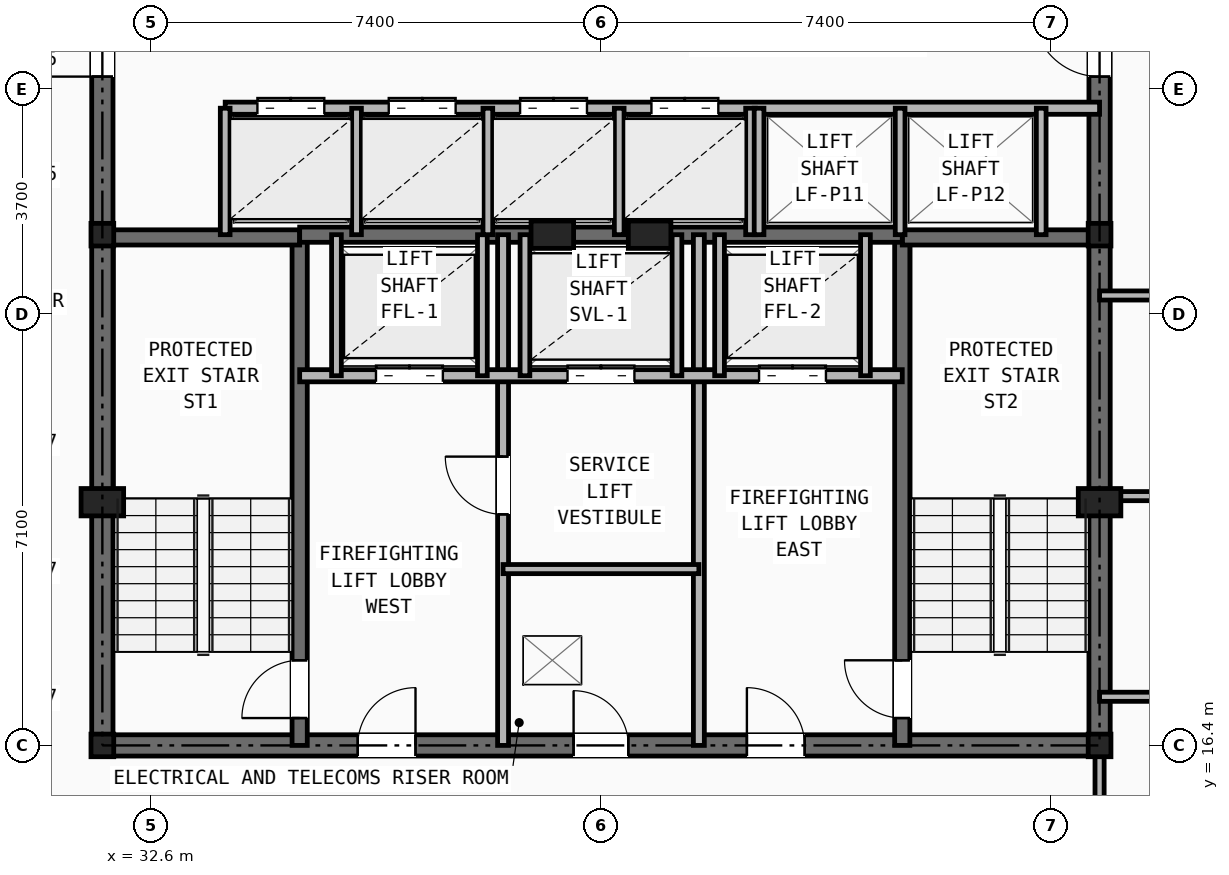
"""IFC4 building model, lengths in metres.
Left out: names, types, materials, properties, quantities, classifications, styles, units other than length and angle.
Written with IfcOpenShell. Run it as: python <this file> out.ifc"""

import sys

from ifc_helpers import new_model, si_unit, direction, frame, frame_2d, origin, origin_2d, place, context, subcontext, project, spatial, rectangle, i_section, extrude, element, fill, save


model = new_model("IFC4")
c1 = context("Model", 3, precision=1e-05, world=origin(), true_north=direction((0.0, 1.0)))
c2 = subcontext(c1, "Body", "Model", "MODEL_VIEW")
j1 = project(units=[si_unit("LENGTHUNIT", "METRE"), si_unit("PLANEANGLEUNIT", "RADIAN")], contexts=[c1])
p1 = place(None, origin())
s1 = spatial("IfcSite", under=j1, at=p1, CompositionType="ELEMENT")
p2 = place(p1, origin())
s2 = spatial("IfcBuilding", under=s1, at=p2, CompositionType="ELEMENT")
p3 = place(p2, frame((0.0, 0.0, 175.8)))
s3 = spatial("IfcBuildingStorey", under=s2, at=p3, CompositionType="ELEMENT", Elevation=175.8)
for number, where, z_axis, x_axis in (
    (1, (31.8, 16.4, 0.0), (0.0, 0.0, 1.0), (1.0, 0.0, 0.0)),
    (2, (48.2, 16.4, 0.0), (0.0, 0.0, 1.0), (1.0, 0.0, 0.0)),
    (3, (31.8, 24.8, 0.0), (0.0, 0.0, 1.0), (1.0, 0.0, 0.0)),
    (4, (48.2, 24.8, 0.0), (0.0, 0.0, 1.0), (1.0, 0.0, 0.0)),
):
    element("IfcColumn", number, at=place(p3, frame(where, z_axis=z_axis, x_axis=x_axis)), inside=s3, PredefinedType="COLUMN", context=c2, shape_type="SweptSolid", body=[
        extrude(i_section(OverallWidth=0.374, OverallDepth=0.372, WebThickness=0.016, FlangeThickness=0.026, at=origin_2d()), origin(), (0.0, 0.0, 1.0), 3.45),
    ])
for number, where, z_axis, x_axis in (
    (5, (31.8, 20.4, 0.0), (0.0, 0.0, 1.0), (1.0, 0.0, 0.0)),
    (6, (48.2, 20.4, 0.0), (0.0, 0.0, 1.0), (1.0, 0.0, 0.0)),
    (7, (39.2, 24.8, 0.0), (0.0, 0.0, 1.0), (1.0, 0.0, 0.0)),
    (8, (40.8, 24.8, 0.0), (0.0, 0.0, 1.0), (1.0, 0.0, 0.0)),
):
    element("IfcColumn", number, at=place(p3, frame(where, z_axis=z_axis, x_axis=x_axis)), inside=s3, PredefinedType="PILASTER", context=c2, shape_type="SweptSolid", body=[
        extrude(rectangle(XDim=0.7, YDim=0.45, at=origin_2d()), origin(), (0.0, 0.0, 1.0), 3.45),
    ])
p4 = place(p3, frame((31.8, 16.4, 0.0), z_axis=(0.0, 0.0, 1.0), x_axis=(1.0, 0.0, 0.0)))
e9 = element("IfcWall", 9, at=p4, inside=s3, PredefinedType="SHEAR", context=c2, shape_type="SweptSolid", body=[
    extrude(rectangle(XDim=16.4, YDim=0.35, at=frame_2d((8.2, 0.0))), origin(), (0.0, 0.0, 1.0), 3.21),
])
p5 = place(p4, frame((7.75, 0.0, 0.0)))
e10 = element("IfcOpeningElement", 10, at=p5, cuts=e9, PredefinedType="OPENING", context=c2, shape_type="SweptSolid", body=[
    extrude(rectangle(XDim=0.9, YDim=2.1, at=frame_2d((0.45, 1.05))), frame((0.0, 0.185, 0.0), z_axis=(0.0, -1.0, 0.0), x_axis=(1.0, 0.0, 0.0)), (0.0, 0.0, 1.0), 0.37),
])
p6 = place(p4, frame((4.2, 0.0, 0.0)))
e11 = element("IfcOpeningElement", 11, at=p6, cuts=e9, PredefinedType="OPENING", context=c2, shape_type="SweptSolid", body=[
    extrude(rectangle(XDim=0.95, YDim=2.1, at=frame_2d((0.475, 1.05))), frame((0.0, 0.185, 0.0), z_axis=(0.0, -1.0, 0.0), x_axis=(1.0, 0.0, 0.0)), (0.0, 0.0, 1.0), 0.37),
])
p7 = place(p4, frame((10.6, 0.0, 0.0)))
e12 = element("IfcOpeningElement", 12, at=p7, cuts=e9, PredefinedType="OPENING", context=c2, shape_type="SweptSolid", body=[
    extrude(rectangle(XDim=0.95, YDim=2.1, at=frame_2d((0.475, 1.05))), frame((0.0, 0.185, 0.0), z_axis=(0.0, -1.0, 0.0), x_axis=(1.0, 0.0, 0.0)), (0.0, 0.0, 1.0), 0.37),
])
p8 = place(p3, frame((31.8, 16.4, 0.0), z_axis=(0.0, 0.0, 1.0), x_axis=(0.0, 1.0, 0.0)))
e13 = element("IfcWall", 13, at=p8, inside=s3, PredefinedType="SHEAR", context=c2, shape_type="SweptSolid", body=[
    extrude(rectangle(XDim=14.8, YDim=0.35, at=frame_2d((7.4, 0.0))), origin(), (0.0, 0.0, 1.0), 3.21),
])
p9 = place(p8, frame((11.0, 0.0, 0.0)))
e14 = element("IfcOpeningElement", 14, at=p9, cuts=e13, PredefinedType="OPENING", context=c2, shape_type="SweptSolid", body=[
    extrude(rectangle(XDim=1.1, YDim=2.15, at=frame_2d((0.55, 1.075))), frame((0.0, 0.185, 0.0), z_axis=(0.0, -1.0, 0.0), x_axis=(1.0, 0.0, 0.0)), (0.0, 0.0, 1.0), 0.37),
])
p10 = place(p3, frame((48.2, 16.4, 0.0), z_axis=(0.0, 0.0, 1.0), x_axis=(0.0, 1.0, 0.0)))
e15 = element("IfcWall", 15, at=p10, inside=s3, PredefinedType="SHEAR", context=c2, shape_type="SweptSolid", body=[
    extrude(rectangle(XDim=14.8, YDim=0.35, at=frame_2d((7.4, 0.0))), origin(), (0.0, 0.0, 1.0), 3.21),
])
p11 = place(p10, frame((11.0, 0.0, 0.0)))
e16 = element("IfcOpeningElement", 16, at=p11, cuts=e15, PredefinedType="OPENING", context=c2, shape_type="SweptSolid", body=[
    extrude(rectangle(XDim=1.1, YDim=2.15, at=frame_2d((0.55, 1.075))), frame((0.0, 0.185, 0.0), z_axis=(0.0, -1.0, 0.0), x_axis=(1.0, 0.0, 0.0)), (0.0, 0.0, 1.0), 0.37),
])
p12 = place(p3, frame((35.045, 16.4, 0.0), z_axis=(0.0, 0.0, 1.0), x_axis=(0.0, 1.0, 0.0)))
e17 = element("IfcWall", 17, at=p12, inside=s3, PredefinedType="SHEAR", context=c2, shape_type="SweptSolid", body=[
    extrude(rectangle(XDim=8.4, YDim=0.25, at=frame_2d((4.2, 0.0))), origin(), (0.0, 0.0, 1.0), 3.21),
])
p13 = place(p12, frame((0.45, 0.0, 0.0)))
e18 = element("IfcOpeningElement", 18, at=p13, cuts=e17, PredefinedType="OPENING", context=c2, shape_type="SweptSolid", body=[
    extrude(rectangle(XDim=0.95, YDim=2.1, at=frame_2d((0.475, 1.05))), frame((0.0, 0.135, 0.0), z_axis=(0.0, -1.0, 0.0), x_axis=(1.0, 0.0, 0.0)), (0.0, 0.0, 1.0), 0.27),
])
p14 = place(p3, frame((31.8, 24.755, 0.0), z_axis=(0.0, 0.0, 1.0), x_axis=(1.0, 0.0, 0.0)))
e19 = element("IfcWall", 19, at=p14, inside=s3, PredefinedType="SHEAR", context=c2, shape_type="SweptSolid", body=[
    extrude(rectangle(XDim=3.245, YDim=0.25, at=frame_2d((1.623, 0.0))), origin(), (0.0, 0.0, 1.0), 3.21),
])
p15 = place(p3, frame((44.955, 16.4, 0.0), z_axis=(0.0, 0.0, 1.0), x_axis=(0.0, 1.0, 0.0)))
e20 = element("IfcWall", 20, at=p15, inside=s3, PredefinedType="SHEAR", context=c2, shape_type="SweptSolid", body=[
    extrude(rectangle(XDim=8.4, YDim=0.25, at=frame_2d((4.2, 0.0))), origin(), (0.0, 0.0, 1.0), 3.21),
])
p16 = place(p15, frame((0.45, 0.0, 0.0)))
e21 = element("IfcOpeningElement", 21, at=p16, cuts=e20, PredefinedType="OPENING", context=c2, shape_type="SweptSolid", body=[
    extrude(rectangle(XDim=0.95, YDim=2.1, at=frame_2d((0.475, 1.05))), frame((0.0, 0.135, 0.0), z_axis=(0.0, -1.0, 0.0), x_axis=(1.0, 0.0, 0.0)), (0.0, 0.0, 1.0), 0.27),
])
p17 = place(p3, frame((44.955, 24.755, 0.0), z_axis=(0.0, 0.0, 1.0), x_axis=(1.0, 0.0, 0.0)))
e22 = element("IfcWall", 22, at=p17, inside=s3, PredefinedType="SHEAR", context=c2, shape_type="SweptSolid", body=[
    extrude(rectangle(XDim=3.245, YDim=0.25, at=frame_2d((1.623, 0.0))), origin(), (0.0, 0.0, 1.0), 3.21),
])
p18 = place(p3, frame((35.045, 24.8, 0.0), z_axis=(0.0, 0.0, 1.0), x_axis=(1.0, 0.0, 0.0)))
e23 = element("IfcWall", 23, at=p18, inside=s3, PredefinedType="SHEAR", context=c2, shape_type="SweptSolid", body=[
    extrude(rectangle(XDim=9.91, YDim=0.25, at=frame_2d((4.955, 0.0))), origin(), (0.0, 0.0, 1.0), 3.21),
])
p19 = place(p3, frame((38.39, 16.4, 0.0), z_axis=(0.0, 0.0, 1.0), x_axis=(0.0, 1.0, 0.0)))
e24 = element("IfcWall", 24, at=p19, inside=s3, PredefinedType="PARTITIONING", context=c2, shape_type="SweptSolid", body=[
    extrude(rectangle(XDim=8.4, YDim=0.18, at=frame_2d((4.2, 0.0))), origin(), (0.0, 0.0, 1.0), 2.938),
])
p20 = place(p19, frame((3.8, 0.0, 0.0)))
e25 = element("IfcOpeningElement", 25, at=p20, cuts=e24, PredefinedType="OPENING", context=c2, shape_type="SweptSolid", body=[
    extrude(rectangle(XDim=0.95, YDim=2.1, at=frame_2d((0.475, 1.05))), frame((0.0, 0.1, 0.0), z_axis=(0.0, -1.0, 0.0), x_axis=(1.0, 0.0, 0.0)), (0.0, 0.0, 1.0), 0.2),
])
p21 = place(p3, frame((41.61, 16.4, 0.0), z_axis=(0.0, 0.0, 1.0), x_axis=(0.0, 1.0, 0.0)))
e26 = element("IfcWall", 26, at=p21, inside=s3, PredefinedType="PARTITIONING", context=c2, shape_type="SweptSolid", body=[
    extrude(rectangle(XDim=8.4, YDim=0.18, at=frame_2d((4.2, 0.0))), origin(), (0.0, 0.0, 1.0), 2.938),
])
p22 = place(p3, frame((35.045, 22.48, 0.0), z_axis=(0.0, 0.0, 1.0), x_axis=(1.0, 0.0, 0.0)))
e27 = element("IfcWall", 27, at=p22, inside=s3, PredefinedType="SOLIDWALL", context=c2, shape_type="SweptSolid", body=[
    extrude(rectangle(XDim=9.91, YDim=0.2, at=frame_2d((4.955, 0.0))), origin(), (0.0, 0.0, 1.0), 3.21),
])
p23 = place(p22, frame((1.255, 0.0, 0.0)))
e28 = element("IfcOpeningElement", 28, at=p23, cuts=e27, PredefinedType="OPENING", context=c2, shape_type="SweptSolid", body=[
    extrude(rectangle(XDim=1.1, YDim=2.15, at=frame_2d((0.55, 1.075))), frame((0.0, 0.11, 0.0), z_axis=(0.0, -1.0, 0.0), x_axis=(1.0, 0.0, 0.0)), (0.0, 0.0, 1.0), 0.22),
])
p24 = place(p22, frame((7.555, 0.0, 0.0)))
e29 = element("IfcOpeningElement", 29, at=p24, cuts=e27, PredefinedType="OPENING", context=c2, shape_type="SweptSolid", body=[
    extrude(rectangle(XDim=1.1, YDim=2.15, at=frame_2d((0.55, 1.075))), frame((0.0, 0.11, 0.0), z_axis=(0.0, -1.0, 0.0), x_axis=(1.0, 0.0, 0.0)), (0.0, 0.0, 1.0), 0.22),
])
p25 = place(p22, frame((4.405, 0.0, 0.0)))
e30 = element("IfcOpeningElement", 30, at=p25, cuts=e27, PredefinedType="OPENING", context=c2, shape_type="SweptSolid", body=[
    extrude(rectangle(XDim=1.1, YDim=2.15, at=frame_2d((0.55, 1.075))), frame((0.0, 0.11, 0.0), z_axis=(0.0, -1.0, 0.0), x_axis=(1.0, 0.0, 0.0)), (0.0, 0.0, 1.0), 0.22),
])
p26 = place(p3, frame((38.39, 19.3, 0.0), z_axis=(0.0, 0.0, 1.0), x_axis=(1.0, 0.0, 0.0)))
e31 = element("IfcWall", 31, at=p26, inside=s3, PredefinedType="PARTITIONING", context=c2, shape_type="SweptSolid", body=[
    extrude(rectangle(XDim=3.22, YDim=0.15, at=frame_2d((1.61, 0.0))), origin(), (0.0, 0.0, 1.0), 3.21),
])
for number, where, z_axis, x_axis in (
    (32, (35.65, 22.48, 0.0), (0.0, 0.0, 1.0), (0.0, 1.0, 0.0)),
    (33, (38.05, 22.48, 0.0), (0.0, 0.0, 1.0), (0.0, 1.0, 0.0)),
    (34, (41.95, 22.48, 0.0), (0.0, 0.0, 1.0), (0.0, 1.0, 0.0)),
    (35, (44.35, 22.48, 0.0), (0.0, 0.0, 1.0), (0.0, 1.0, 0.0)),
    (36, (38.75, 22.48, 0.0), (0.0, 0.0, 1.0), (0.0, 1.0, 0.0)),
    (37, (41.25, 22.48, 0.0), (0.0, 0.0, 1.0), (0.0, 1.0, 0.0)),
):
    element("IfcWall", number, at=place(p3, frame(where, z_axis=z_axis, x_axis=x_axis)), inside=s3, PredefinedType="SOLIDWALL", context=c2, shape_type="SweptSolid", body=[
        extrude(rectangle(XDim=2.32, YDim=0.16, at=frame_2d((1.16, 0.0))), origin(), (0.0, 0.0, 1.0), 3.21),
    ])
p27 = place(p3, frame((33.82, 26.88, 0.0), z_axis=(0.0, 0.0, 1.0), x_axis=(1.0, 0.0, 0.0)))
e38 = element("IfcWall", 38, at=p27, inside=s3, PredefinedType="SOLIDWALL", context=c2, shape_type="SweptSolid", body=[
    extrude(rectangle(XDim=14.38, YDim=0.2, at=frame_2d((7.19, 0.0))), origin(), (0.0, 0.0, 1.0), 2.665),
])
p28 = place(p27, frame((0.53, 0.0, 0.0)))
e39 = element("IfcOpeningElement", 39, at=p28, cuts=e38, PredefinedType="OPENING", context=c2, shape_type="SweptSolid", body=[
    extrude(rectangle(XDim=1.1, YDim=2.15, at=frame_2d((0.55, 1.075))), frame((0.0, 0.11, 0.0), z_axis=(0.0, -1.0, 0.0), x_axis=(1.0, 0.0, 0.0)), (0.0, 0.0, 1.0), 0.22),
])
p29 = place(p27, frame((2.69, 0.0, 0.0)))
e40 = element("IfcOpeningElement", 40, at=p29, cuts=e38, PredefinedType="OPENING", context=c2, shape_type="SweptSolid", body=[
    extrude(rectangle(XDim=1.1, YDim=2.15, at=frame_2d((0.55, 1.075))), frame((0.0, 0.11, 0.0), z_axis=(0.0, -1.0, 0.0), x_axis=(1.0, 0.0, 0.0)), (0.0, 0.0, 1.0), 0.22),
])
p30 = place(p27, frame((4.85, 0.0, 0.0)))
e41 = element("IfcOpeningElement", 41, at=p30, cuts=e38, PredefinedType="OPENING", context=c2, shape_type="SweptSolid", body=[
    extrude(rectangle(XDim=1.1, YDim=2.15, at=frame_2d((0.55, 1.075))), frame((0.0, 0.11, 0.0), z_axis=(0.0, -1.0, 0.0), x_axis=(1.0, 0.0, 0.0)), (0.0, 0.0, 1.0), 0.22),
])
p31 = place(p27, frame((7.01, 0.0, 0.0)))
e42 = element("IfcOpeningElement", 42, at=p31, cuts=e38, PredefinedType="OPENING", context=c2, shape_type="SweptSolid", body=[
    extrude(rectangle(XDim=1.1, YDim=2.15, at=frame_2d((0.55, 1.075))), frame((0.0, 0.11, 0.0), z_axis=(0.0, -1.0, 0.0), x_axis=(1.0, 0.0, 0.0)), (0.0, 0.0, 1.0), 0.22),
])
for number, where, z_axis, x_axis in (
    (43, (33.82, 24.8, 0.0), (0.0, 0.0, 1.0), (0.0, 1.0, 0.0)),
    (44, (35.98, 24.8, 0.0), (0.0, 0.0, 1.0), (0.0, 1.0, 0.0)),
    (45, (38.14, 24.8, 0.0), (0.0, 0.0, 1.0), (0.0, 1.0, 0.0)),
    (46, (40.3, 24.8, 0.0), (0.0, 0.0, 1.0), (0.0, 1.0, 0.0)),
    (47, (42.46, 24.8, 0.0), (0.0, 0.0, 1.0), (0.0, 1.0, 0.0)),
    (48, (42.6, 24.8, 0.0), (0.0, 0.0, 1.0), (0.0, 1.0, 0.0)),
    (49, (44.92, 24.8, 0.0), (0.0, 0.0, 1.0), (0.0, 1.0, 0.0)),
    (50, (47.24, 24.8, 0.0), (0.0, 0.0, 1.0), (0.0, 1.0, 0.0)),
):
    element("IfcWall", number, at=place(p3, frame(where, z_axis=z_axis, x_axis=x_axis)), inside=s3, PredefinedType="SOLIDWALL", context=c2, shape_type="SweptSolid", body=[
        extrude(rectangle(XDim=2.08, YDim=0.16, at=frame_2d((1.04, 0.0))), origin(), (0.0, 0.0, 1.0), 3.21),
    ])
p32 = place(p3, frame((48.2, 14.1, 0.0), z_axis=(0.0, 0.0, 1.0), x_axis=(0.0, 1.0, 0.0)))
e51 = element("IfcWall", 51, at=p32, inside=s3, PredefinedType="PARTITIONING", context=c2, shape_type="SweptSolid", body=[
    extrude(rectangle(XDim=2.3, YDim=0.15, at=frame_2d((1.15, 0.0))), origin(), (0.0, 0.0, 1.0), 2.665),
])
p33 = place(p3, frame((48.2, 17.2, 0.0), z_axis=(0.0, 0.0, 1.0), x_axis=(1.0, 0.0, 0.0)))
e52 = element("IfcWall", 52, at=p33, inside=s3, PredefinedType="PARTITIONING", context=c2, shape_type="SweptSolid", body=[
    extrude(rectangle(XDim=16.244, YDim=0.15, at=frame_2d((8.122, 0.0))), origin(), (0.0, 0.0, 1.0), 2.589),
])
p34 = place(p33, frame((1.4, 0.0, 0.0)))
e53 = element("IfcOpeningElement", 53, at=p34, cuts=e52, PredefinedType="OPENING", context=c2, shape_type="SweptSolid", body=[
    extrude(rectangle(XDim=0.95, YDim=2.1, at=frame_2d((0.475, 1.05))), frame((0.0, 0.085, 0.0), z_axis=(0.0, -1.0, 0.0), x_axis=(1.0, 0.0, 0.0)), (0.0, 0.0, 1.0), 0.17),
])
p35 = place(p3, frame((48.2, 20.5, 0.0), z_axis=(0.0, 0.0, 1.0), x_axis=(1.0, 0.0, 0.0)))
e54 = element("IfcWall", 54, at=p35, inside=s3, PredefinedType="PARTITIONING", context=c2, shape_type="SweptSolid", body=[
    extrude(rectangle(XDim=14.171, YDim=0.15, at=frame_2d((7.085, 0.0))), origin(), (0.0, 0.0, 1.0), 2.589),
])
p36 = place(p35, frame((1.4, 0.0, 0.0)))
e55 = element("IfcOpeningElement", 55, at=p36, cuts=e54, PredefinedType="OPENING", context=c2, shape_type="SweptSolid", body=[
    extrude(rectangle(XDim=0.95, YDim=2.1, at=frame_2d((0.475, 1.05))), frame((0.0, 0.085, 0.0), z_axis=(0.0, -1.0, 0.0), x_axis=(1.0, 0.0, 0.0)), (0.0, 0.0, 1.0), 0.17),
])
p37 = place(p3, frame((48.2, 23.8, 0.0), z_axis=(0.0, 0.0, 1.0), x_axis=(1.0, 0.0, 0.0)))
e56 = element("IfcWall", 56, at=p37, inside=s3, PredefinedType="PARTITIONING", context=c2, shape_type="SweptSolid", body=[
    extrude(rectangle(XDim=12.097, YDim=0.15, at=frame_2d((6.049, 0.0))), origin(), (0.0, 0.0, 1.0), 2.589),
])
p38 = place(p37, frame((1.4, 0.0, 0.0)))
e57 = element("IfcOpeningElement", 57, at=p38, cuts=e56, PredefinedType="OPENING", context=c2, shape_type="SweptSolid", body=[
    extrude(rectangle(XDim=0.95, YDim=2.1, at=frame_2d((0.475, 1.05))), frame((0.0, 0.085, 0.0), z_axis=(0.0, -1.0, 0.0), x_axis=(1.0, 0.0, 0.0)), (0.0, 0.0, 1.0), 0.17),
])
p39 = place(p5, origin())
e58 = element("IfcDoor", 58, at=p39, inside=s3, OperationType="SINGLE_SWING_LEFT", PredefinedType="DOOR", context=c2, shape_type="SweptSolid", body=[
    extrude(rectangle(XDim=0.9, YDim=2.1, at=frame_2d((0.45, 1.05))), frame((0.0, 0.025, 0.0), z_axis=(0.0, -1.0, 0.0), x_axis=(1.0, 0.0, 0.0)), (0.0, 0.0, 1.0), 0.05),
])
fill(e10, e58)
p40 = place(p20, origin())
e59 = element("IfcDoor", 59, at=p40, inside=s3, OperationType="SINGLE_SWING_RIGHT", PredefinedType="DOOR", context=c2, shape_type="SweptSolid", body=[
    extrude(rectangle(XDim=0.95, YDim=2.1, at=frame_2d((0.475, 1.05))), frame((0.0, 0.025, 0.0), z_axis=(0.0, -1.0, 0.0), x_axis=(1.0, 0.0, 0.0)), (0.0, 0.0, 1.0), 0.05),
])
fill(e25, e59)
p41 = place(p13, origin())
e60 = element("IfcDoor", 60, at=p41, inside=s3, OperationType="SINGLE_SWING_LEFT", PredefinedType="DOOR", context=c2, shape_type="SweptSolid", body=[
    extrude(rectangle(XDim=0.95, YDim=2.1, at=frame_2d((0.475, 1.05))), frame((0.0, 0.025, 0.0), z_axis=(0.0, -1.0, 0.0), x_axis=(1.0, 0.0, 0.0)), (0.0, 0.0, 1.0), 0.05),
])
fill(e18, e60)
p42 = place(p16, origin())
e61 = element("IfcDoor", 61, at=p42, inside=s3, OperationType="SINGLE_SWING_RIGHT", PredefinedType="DOOR", context=c2, shape_type="SweptSolid", body=[
    extrude(rectangle(XDim=0.95, YDim=2.1, at=frame_2d((0.475, 1.05))), frame((0.0, 0.025, 0.0), z_axis=(0.0, -1.0, 0.0), x_axis=(1.0, 0.0, 0.0)), (0.0, 0.0, 1.0), 0.05),
])
fill(e21, e61)
p43 = place(p6, origin())
e62 = element("IfcDoor", 62, at=p43, inside=s3, OperationType="SINGLE_SWING_RIGHT", PredefinedType="DOOR", context=c2, shape_type="SweptSolid", body=[
    extrude(rectangle(XDim=0.95, YDim=2.1, at=frame_2d((0.475, 1.05))), frame((0.0, 0.025, 0.0), z_axis=(0.0, -1.0, 0.0), x_axis=(1.0, 0.0, 0.0)), (0.0, 0.0, 1.0), 0.05),
])
fill(e11, e62)
p44 = place(p7, origin())
e63 = element("IfcDoor", 63, at=p44, inside=s3, OperationType="SINGLE_SWING_LEFT", PredefinedType="DOOR", context=c2, shape_type="SweptSolid", body=[
    extrude(rectangle(XDim=0.95, YDim=2.1, at=frame_2d((0.475, 1.05))), frame((0.0, 0.025, 0.0), z_axis=(0.0, -1.0, 0.0), x_axis=(1.0, 0.0, 0.0)), (0.0, 0.0, 1.0), 0.05),
])
fill(e12, e63)
p45 = place(p23, origin())
e64 = element("IfcDoor", 64, at=p45, inside=s3, OperationType="DOUBLE_DOOR_SLIDING", PredefinedType="DOOR", context=c2, shape_type="SweptSolid", body=[
    extrude(rectangle(XDim=1.1, YDim=2.15, at=frame_2d((0.55, 1.075))), frame((0.0, 0.025, 0.0), z_axis=(0.0, -1.0, 0.0), x_axis=(1.0, 0.0, 0.0)), (0.0, 0.0, 1.0), 0.05),
])
fill(e28, e64)
p46 = place(p24, origin())
e65 = element("IfcDoor", 65, at=p46, inside=s3, OperationType="DOUBLE_DOOR_SLIDING", PredefinedType="DOOR", context=c2, shape_type="SweptSolid", body=[
    extrude(rectangle(XDim=1.1, YDim=2.15, at=frame_2d((0.55, 1.075))), frame((0.0, 0.025, 0.0), z_axis=(0.0, -1.0, 0.0), x_axis=(1.0, 0.0, 0.0)), (0.0, 0.0, 1.0), 0.05),
])
fill(e29, e65)
p47 = place(p25, origin())
e66 = element("IfcDoor", 66, at=p47, inside=s3, OperationType="DOUBLE_DOOR_SLIDING", PredefinedType="DOOR", context=c2, shape_type="SweptSolid", body=[
    extrude(rectangle(XDim=1.1, YDim=2.15, at=frame_2d((0.55, 1.075))), frame((0.0, 0.025, 0.0), z_axis=(0.0, -1.0, 0.0), x_axis=(1.0, 0.0, 0.0)), (0.0, 0.0, 1.0), 0.05),
])
fill(e30, e66)
p48 = place(p9, origin())
e67 = element("IfcDoor", 67, at=p48, inside=s3, OperationType="SINGLE_SWING_LEFT", PredefinedType="DOOR", context=c2, shape_type="SweptSolid", body=[
    extrude(rectangle(XDim=1.1, YDim=2.15, at=frame_2d((0.55, 1.075))), frame((0.0, 0.025, 0.0), z_axis=(0.0, -1.0, 0.0), x_axis=(1.0, 0.0, 0.0)), (0.0, 0.0, 1.0), 0.05),
])
fill(e14, e67)
p49 = place(p11, origin())
e68 = element("IfcDoor", 68, at=p49, inside=s3, OperationType="SINGLE_SWING_RIGHT", PredefinedType="DOOR", context=c2, shape_type="SweptSolid", body=[
    extrude(rectangle(XDim=1.1, YDim=2.15, at=frame_2d((0.55, 1.075))), frame((0.0, 0.025, 0.0), z_axis=(0.0, -1.0, 0.0), x_axis=(1.0, 0.0, 0.0)), (0.0, 0.0, 1.0), 0.05),
])
fill(e16, e68)
p50 = place(p28, origin())
e69 = element("IfcDoor", 69, at=p50, inside=s3, OperationType="DOUBLE_DOOR_SLIDING", PredefinedType="DOOR", context=c2, shape_type="SweptSolid", body=[
    extrude(rectangle(XDim=1.1, YDim=2.15, at=frame_2d((0.55, 1.075))), frame((0.0, 0.025, 0.0), z_axis=(0.0, -1.0, 0.0), x_axis=(1.0, 0.0, 0.0)), (0.0, 0.0, 1.0), 0.05),
])
fill(e39, e69)
p51 = place(p29, origin())
e70 = element("IfcDoor", 70, at=p51, inside=s3, OperationType="DOUBLE_DOOR_SLIDING", PredefinedType="DOOR", context=c2, shape_type="SweptSolid", body=[
    extrude(rectangle(XDim=1.1, YDim=2.15, at=frame_2d((0.55, 1.075))), frame((0.0, 0.025, 0.0), z_axis=(0.0, -1.0, 0.0), x_axis=(1.0, 0.0, 0.0)), (0.0, 0.0, 1.0), 0.05),
])
fill(e40, e70)
p52 = place(p30, origin())
e71 = element("IfcDoor", 71, at=p52, inside=s3, OperationType="DOUBLE_DOOR_SLIDING", PredefinedType="DOOR", context=c2, shape_type="SweptSolid", body=[
    extrude(rectangle(XDim=1.1, YDim=2.15, at=frame_2d((0.55, 1.075))), frame((0.0, 0.025, 0.0), z_axis=(0.0, -1.0, 0.0), x_axis=(1.0, 0.0, 0.0)), (0.0, 0.0, 1.0), 0.05),
])
fill(e41, e71)
p53 = place(p31, origin())
e72 = element("IfcDoor", 72, at=p53, inside=s3, OperationType="DOUBLE_DOOR_SLIDING", PredefinedType="DOOR", context=c2, shape_type="SweptSolid", body=[
    extrude(rectangle(XDim=1.1, YDim=2.15, at=frame_2d((0.55, 1.075))), frame((0.0, 0.025, 0.0), z_axis=(0.0, -1.0, 0.0), x_axis=(1.0, 0.0, 0.0)), (0.0, 0.0, 1.0), 0.05),
])
fill(e42, e72)
save(model, sys.argv[1])
